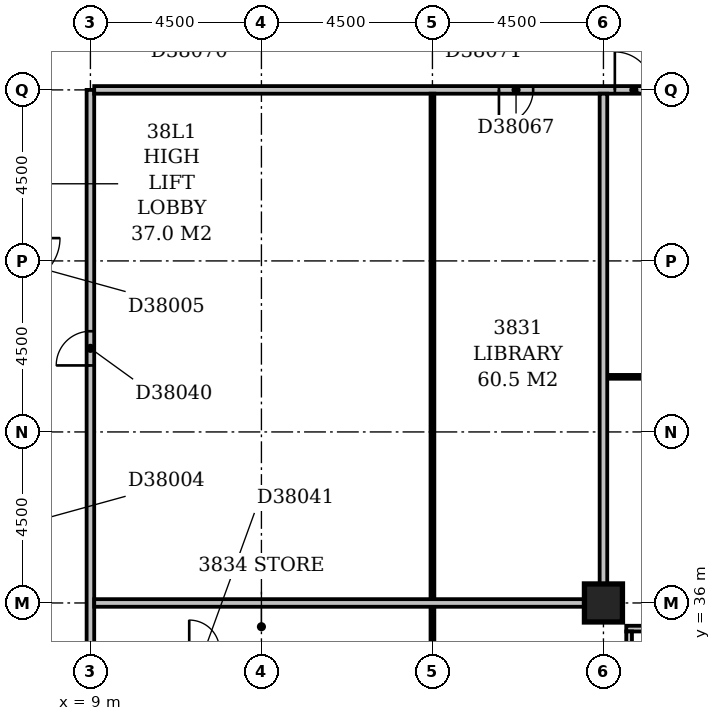
"""IFC4 building model, lengths in metres.
Left out: names, types, materials, properties, quantities, classifications, styles, units other than length and angle.
Written with IfcOpenShell. Run it as: python <this file> out.ifc"""

import sys

from ifc_helpers import new_model, si_unit, direction, frame, frame_2d, origin, origin_2d, place, context, subcontext, project, spatial, rectangle, extrude, element, fill, save


model = new_model("IFC4")
c1 = context("Model", 3, precision=1e-05, world=origin(), true_north=direction((0.0, 1.0)))
c2 = subcontext(c1, "Body", "Model", "MODEL_VIEW")
j1 = project(units=[si_unit("LENGTHUNIT", "METRE"), si_unit("PLANEANGLEUNIT", "RADIAN")], contexts=[c1])
p1 = place(None, origin())
s1 = spatial("IfcSite", under=j1, at=p1, CompositionType="ELEMENT")
p2 = place(p1, origin())
s2 = spatial("IfcBuilding", under=s1, at=p2, CompositionType="ELEMENT")
p3 = place(p2, frame((0.0, 0.0, 152.0)))
s3 = spatial("IfcBuildingStorey", under=s2, at=p3, CompositionType="ELEMENT", Elevation=152.0)
p4 = place(p3, frame((22.5, 36.0, -0.3), z_axis=(0.0, 0.0, 1.0), x_axis=(1.0, 0.0, 0.0)))
e1 = element("IfcColumn", 1, at=p4, inside=s3, PredefinedType="COLUMN", context=c2, shape_type="SweptSolid", body=[
    extrude(rectangle(XDim=1.0, YDim=1.0, at=origin_2d()), origin(), (0.0, 0.0, 1.0), 3.6),
])
p5 = place(p3, frame((23.175, 17.4, 0.0), z_axis=(0.0, 0.0, 1.0), x_axis=(0.0, 1.0, 0.0)))
e2 = element("IfcWall", 2, at=p5, inside=s3, PredefinedType="STANDARD", context=c2, shape_type="SweptSolid", body=[
    extrude(rectangle(XDim=17.85, YDim=0.15, at=frame_2d((8.925, 0.0))), origin(), (0.0, 0.0, 1.0), 2.7),
])
p6 = place(p5, frame((1.65, 0.0, 0.6)))
e3 = element("IfcOpeningElement", 3, at=p6, cuts=e2, PredefinedType="OPENING", context=c2, shape_type="SweptSolid", body=[
    extrude(rectangle(XDim=2.4, YDim=1.8, at=frame_2d((1.2, 0.9))), frame((0.0, 0.087, 0.0), z_axis=(0.0, -1.0, 0.0), x_axis=(1.0, 0.0, 0.0)), (0.0, 0.0, 1.0), 0.174),
])
p7 = place(p5, frame((6.15, 0.0, 0.6)))
e4 = element("IfcOpeningElement", 4, at=p7, cuts=e2, PredefinedType="OPENING", context=c2, shape_type="SweptSolid", body=[
    extrude(rectangle(XDim=2.4, YDim=1.8, at=frame_2d((1.2, 0.9))), frame((0.0, 0.087, 0.0), z_axis=(0.0, -1.0, 0.0), x_axis=(1.0, 0.0, 0.0)), (0.0, 0.0, 1.0), 0.174),
])
p8 = place(p5, frame((11.844, 0.0, 0.6)))
e5 = element("IfcOpeningElement", 5, at=p8, cuts=e2, PredefinedType="OPENING", context=c2, shape_type="SweptSolid", body=[
    extrude(rectangle(XDim=1.5, YDim=1.8, at=frame_2d((0.75, 0.9))), frame((0.0, 0.087, 0.0), z_axis=(0.0, -1.0, 0.0), x_axis=(1.0, 0.0, 0.0)), (0.0, 0.0, 1.0), 0.174),
])
p9 = place(p5, frame((15.15, 0.0, 0.6)))
e6 = element("IfcOpeningElement", 6, at=p9, cuts=e2, PredefinedType="OPENING", context=c2, shape_type="SweptSolid", body=[
    extrude(rectangle(XDim=2.4, YDim=1.8, at=frame_2d((1.2, 0.9))), frame((0.0, 0.087, 0.0), z_axis=(0.0, -1.0, 0.0), x_axis=(1.0, 0.0, 0.0)), (0.0, 0.0, 1.0), 0.174),
])
p10 = place(p3, frame((23.1, 35.325, 0.0), z_axis=(0.0, 0.0, 1.0), x_axis=(1.0, 0.0, 0.0)))
e7 = element("IfcWall", 7, at=p10, inside=s3, PredefinedType="STANDARD", context=c2, shape_type="SweptSolid", body=[
    extrude(rectangle(XDim=45.15, YDim=0.15, at=frame_2d((22.575, 0.0))), origin(), (0.0, 0.0, 1.0), 2.7),
])
p11 = place(p10, frame((0.45, 0.0, 0.6)))
e8 = element("IfcOpeningElement", 8, at=p11, cuts=e7, PredefinedType="OPENING", context=c2, shape_type="SweptSolid", body=[
    extrude(rectangle(XDim=2.4, YDim=1.8, at=frame_2d((1.2, 0.9))), frame((0.0, 0.087, 0.0), z_axis=(0.0, -1.0, 0.0), x_axis=(1.0, 0.0, 0.0)), (0.0, 0.0, 1.0), 0.174),
])
p12 = place(p10, frame((4.738, 0.0, 0.6)))
e9 = element("IfcOpeningElement", 9, at=p12, cuts=e7, PredefinedType="OPENING", context=c2, shape_type="SweptSolid", body=[
    extrude(rectangle(XDim=2.1, YDim=1.8, at=frame_2d((1.05, 0.9))), frame((0.0, 0.087, 0.0), z_axis=(0.0, -1.0, 0.0), x_axis=(1.0, 0.0, 0.0)), (0.0, 0.0, 1.0), 0.174),
])
p13 = place(p10, frame((9.45, 0.0, 0.6)))
e10 = element("IfcOpeningElement", 10, at=p13, cuts=e7, PredefinedType="OPENING", context=c2, shape_type="SweptSolid", body=[
    extrude(rectangle(XDim=2.4, YDim=1.8, at=frame_2d((1.2, 0.9))), frame((0.0, 0.087, 0.0), z_axis=(0.0, -1.0, 0.0), x_axis=(1.0, 0.0, 0.0)), (0.0, 0.0, 1.0), 0.174),
])
p14 = place(p10, frame((13.95, 0.0, 0.6)))
e11 = element("IfcOpeningElement", 11, at=p14, cuts=e7, PredefinedType="OPENING", context=c2, shape_type="SweptSolid", body=[
    extrude(rectangle(XDim=2.4, YDim=1.8, at=frame_2d((1.2, 0.9))), frame((0.0, 0.087, 0.0), z_axis=(0.0, -1.0, 0.0), x_axis=(1.0, 0.0, 0.0)), (0.0, 0.0, 1.0), 0.174),
])
p15 = place(p10, frame((19.34, 0.0, 0.6)))
e12 = element("IfcOpeningElement", 12, at=p15, cuts=e7, PredefinedType="OPENING", context=c2, shape_type="SweptSolid", body=[
    extrude(rectangle(XDim=1.8, YDim=1.8, at=frame_2d((0.9, 0.9))), frame((0.0, 0.087, 0.0), z_axis=(0.0, -1.0, 0.0), x_axis=(1.0, 0.0, 0.0)), (0.0, 0.0, 1.0), 0.174),
])
p16 = place(p10, frame((22.95, 0.0, 0.6)))
e13 = element("IfcOpeningElement", 13, at=p16, cuts=e7, PredefinedType="OPENING", context=c2, shape_type="SweptSolid", body=[
    extrude(rectangle(XDim=2.4, YDim=1.8, at=frame_2d((1.2, 0.9))), frame((0.0, 0.087, 0.0), z_axis=(0.0, -1.0, 0.0), x_axis=(1.0, 0.0, 0.0)), (0.0, 0.0, 1.0), 0.174),
])
p17 = place(p10, frame((27.45, 0.0, 0.6)))
e14 = element("IfcOpeningElement", 14, at=p17, cuts=e7, PredefinedType="OPENING", context=c2, shape_type="SweptSolid", body=[
    extrude(rectangle(XDim=2.4, YDim=1.8, at=frame_2d((1.2, 0.9))), frame((0.0, 0.087, 0.0), z_axis=(0.0, -1.0, 0.0), x_axis=(1.0, 0.0, 0.0)), (0.0, 0.0, 1.0), 0.174),
])
p18 = place(p10, frame((31.95, 0.0, 0.6)))
e15 = element("IfcOpeningElement", 15, at=p18, cuts=e7, PredefinedType="OPENING", context=c2, shape_type="SweptSolid", body=[
    extrude(rectangle(XDim=2.4, YDim=1.8, at=frame_2d((1.2, 0.9))), frame((0.0, 0.087, 0.0), z_axis=(0.0, -1.0, 0.0), x_axis=(1.0, 0.0, 0.0)), (0.0, 0.0, 1.0), 0.174),
])
p19 = place(p10, frame((38.27, 0.0, 0.6)))
e16 = element("IfcOpeningElement", 16, at=p19, cuts=e7, PredefinedType="OPENING", context=c2, shape_type="SweptSolid", body=[
    extrude(rectangle(XDim=0.9, YDim=1.8, at=frame_2d((0.45, 0.9))), frame((0.0, 0.087, 0.0), z_axis=(0.0, -1.0, 0.0), x_axis=(1.0, 0.0, 0.0)), (0.0, 0.0, 1.0), 0.174),
])
p20 = place(p10, frame((40.95, 0.0, 0.6)))
e17 = element("IfcOpeningElement", 17, at=p20, cuts=e7, PredefinedType="OPENING", context=c2, shape_type="SweptSolid", body=[
    extrude(rectangle(XDim=2.4, YDim=1.8, at=frame_2d((1.2, 0.9))), frame((0.0, 0.087, 0.0), z_axis=(0.0, -1.0, 0.0), x_axis=(1.0, 0.0, 0.0)), (0.0, 0.0, 1.0), 0.174),
])
p21 = place(p3, frame((18.0, 31.6, 0.0), z_axis=(0.0, 0.0, 1.0), x_axis=(0.0, 1.0, 0.0)))
e18 = element("IfcWall", 18, at=p21, inside=s3, PredefinedType="PARTITIONING", context=c2, shape_type="SweptSolid", body=[
    extrude(rectangle(XDim=17.8, YDim=0.1, at=frame_2d((8.9, 0.0))), origin(), (0.0, 0.0, 1.0), 3.3),
])
p22 = place(p21, frame((1.7, 0.0, 0.0)))
e19 = element("IfcOpeningElement", 19, at=p22, cuts=e18, PredefinedType="OPENING", context=c2, shape_type="SweptSolid", body=[
    extrude(rectangle(XDim=0.9, YDim=2.1, at=frame_2d((0.45, 1.05))), frame((0.0, 0.062, 0.0), z_axis=(0.0, -1.0, 0.0), x_axis=(1.0, 0.0, 0.0)), (0.0, 0.0, 1.0), 0.124),
])
p23 = place(p3, frame((9.0, 34.75, 0.0), z_axis=(0.0, 0.0, 1.0), x_axis=(0.0, 1.0, 0.0)))
e20 = element("IfcWall", 20, at=p23, inside=s3, PredefinedType="PARTITIONING", context=c2, shape_type="SweptSolid", body=[
    extrude(rectangle(XDim=14.75, YDim=0.2, at=frame_2d((7.375, 0.0))), origin(), (0.0, 0.0, 1.0), 3.3),
])
p24 = place(p23, frame((7.5, 0.0, 0.0)))
e21 = element("IfcOpeningElement", 21, at=p24, cuts=e20, PredefinedType="OPENING", context=c2, shape_type="SweptSolid", body=[
    extrude(rectangle(XDim=0.9, YDim=2.1, at=frame_2d((0.45, 1.05))), frame((0.0, 0.112, 0.0), z_axis=(0.0, -1.0, 0.0), x_axis=(1.0, 0.0, 0.0)), (0.0, 0.0, 1.0), 0.224),
])
for number, where, z_axis, x_axis in (
    (22, (9.1, 36.0, 0.0), (0.0, 0.0, 1.0), (1.0, 0.0, 0.0)),
    (23, (22.5, 36.5, 0.0), (0.0, 0.0, 1.0), (0.0, 1.0, 0.0)),
):
    element("IfcWall", number, at=place(p3, frame(where, z_axis=z_axis, x_axis=x_axis)), inside=s3, PredefinedType="PARTITIONING", context=c2, shape_type="SweptSolid", body=[
        extrude(rectangle(XDim=12.9, YDim=0.2, at=frame_2d((6.45, 0.0))), origin(), (0.0, 0.0, 1.0), 3.3),
    ])
p25 = place(p3, frame((22.6, 41.95, 0.0), z_axis=(0.0, 0.0, 1.0), x_axis=(1.0, 0.0, 0.0)))
e24 = element("IfcWall", 24, at=p25, inside=s3, PredefinedType="PARTITIONING", context=c2, shape_type="SweptSolid", body=[
    extrude(rectangle(XDim=8.8, YDim=0.1, at=frame_2d((4.4, 0.0))), origin(), (0.0, 0.0, 1.0), 3.3),
])
p26 = place(p25, frame((1.7, 0.0, 0.0)))
e25 = element("IfcOpeningElement", 25, at=p26, cuts=e24, PredefinedType="OPENING", context=c2, shape_type="SweptSolid", body=[
    extrude(rectangle(XDim=0.9, YDim=2.1, at=frame_2d((0.45, 1.05))), frame((0.0, 0.062, 0.0), z_axis=(0.0, -1.0, 0.0), x_axis=(1.0, 0.0, 0.0)), (0.0, 0.0, 1.0), 0.124),
])
p27 = place(p25, frame((6.2, 0.0, 0.0)))
e26 = element("IfcOpeningElement", 26, at=p27, cuts=e24, PredefinedType="OPENING", context=c2, shape_type="SweptSolid", body=[
    extrude(rectangle(XDim=0.9, YDim=2.1, at=frame_2d((0.45, 1.05))), frame((0.0, 0.062, 0.0), z_axis=(0.0, -1.0, 0.0), x_axis=(1.0, 0.0, 0.0)), (0.0, 0.0, 1.0), 0.124),
])
p28 = place(p3, frame((9.1, 49.5, 0.0), z_axis=(0.0, 0.0, 1.0), x_axis=(1.0, 0.0, 0.0)))
e27 = element("IfcWall", 27, at=p28, inside=s3, PredefinedType="PARTITIONING", context=c2, shape_type="SweptSolid", body=[
    extrude(rectangle(XDim=23.55, YDim=0.2, at=frame_2d((11.775, 0.0))), origin(), (0.0, 0.0, 1.0), 3.3),
])
p29 = place(p28, frame((13.7, 0.0, 0.0)))
e28 = element("IfcOpeningElement", 28, at=p29, cuts=e27, PredefinedType="OPENING", context=c2, shape_type="SweptSolid", body=[
    extrude(rectangle(XDim=1.0, YDim=2.1, at=frame_2d((0.5, 1.05))), frame((0.0, 0.112, 0.0), z_axis=(0.0, -1.0, 0.0), x_axis=(1.0, 0.0, 0.0)), (0.0, 0.0, 1.0), 0.224),
])
p30 = place(p28, frame((10.65, 0.0, 0.0)))
e29 = element("IfcOpeningElement", 29, at=p30, cuts=e27, PredefinedType="OPENING", context=c2, shape_type="SweptSolid", body=[
    extrude(rectangle(XDim=0.9, YDim=2.1, at=frame_2d((0.45, 1.05))), frame((0.0, 0.112, 0.0), z_axis=(0.0, -1.0, 0.0), x_axis=(1.0, 0.0, 0.0)), (0.0, 0.0, 1.0), 0.224),
])
p31 = place(p24, origin())
e30 = element("IfcDoor", 30, at=p31, inside=s3, OperationType="SINGLE_SWING_LEFT", PredefinedType="DOOR", context=c2, shape_type="SweptSolid", body=[
    extrude(rectangle(XDim=0.9, YDim=2.1, at=frame_2d((0.45, 1.05))), frame((0.0, 0.025, 0.0), z_axis=(0.0, -1.0, 0.0), x_axis=(1.0, 0.0, 0.0)), (0.0, 0.0, 1.0), 0.05),
])
fill(e21, e30)
p32 = place(p29, origin())
e31 = element("IfcDoor", 31, at=p32, inside=s3, OperationType="SINGLE_SWING_LEFT", PredefinedType="DOOR", context=c2, shape_type="SweptSolid", body=[
    extrude(rectangle(XDim=1.0, YDim=2.1, at=frame_2d((0.5, 1.05))), frame((0.0, 0.025, 0.0), z_axis=(0.0, -1.0, 0.0), x_axis=(1.0, 0.0, 0.0)), (0.0, 0.0, 1.0), 0.05),
])
fill(e28, e31)
p33 = place(p30, frame((0.9, 0.0, 0.0), z_axis=(0.0, 0.0, 1.0), x_axis=(-1.0, 0.0, 0.0)))
e32 = element("IfcDoor", 32, at=p33, inside=s3, OperationType="SINGLE_SWING_RIGHT", PredefinedType="DOOR", context=c2, shape_type="SweptSolid", body=[
    extrude(rectangle(XDim=0.9, YDim=2.1, at=frame_2d((0.45, 1.05))), frame((0.0, 0.025, 0.0), z_axis=(0.0, -1.0, 0.0), x_axis=(1.0, 0.0, 0.0)), (0.0, 0.0, 1.0), 0.05),
])
fill(e29, e32)
save(model, sys.argv[1])
